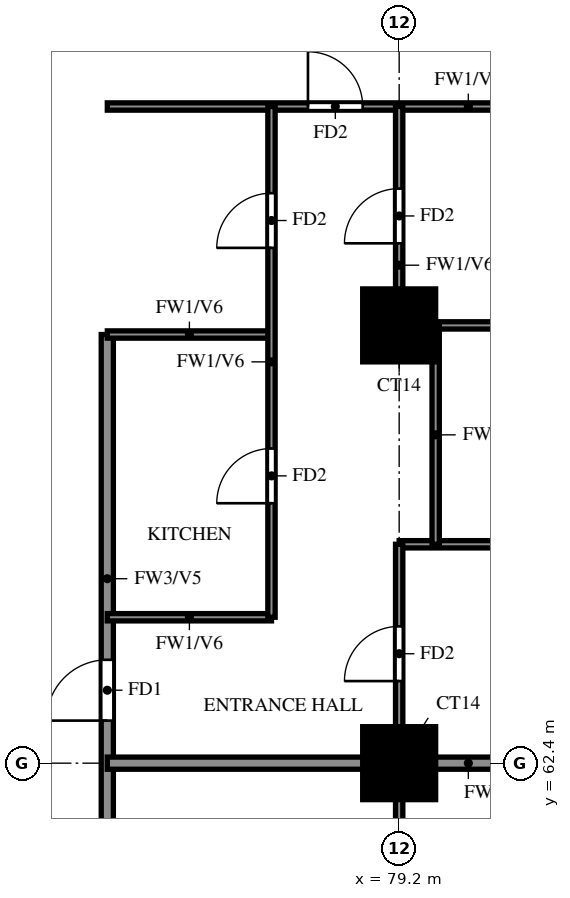
"""IFC4 building model, lengths in metres.
Left out: names, types, materials, properties, quantities, classifications, styles, units other than length and angle.
Written with IfcOpenShell. Run it as: python <this file> out.ifc"""

import sys

from ifc_helpers import new_model, si_unit, direction, frame, frame_2d, origin, origin_2d, place, context, subcontext, project, spatial, rectangle, extrude, source, transform, mapped, element, fill, save


model = new_model("IFC4")
c1 = context("Model", 3, precision=1e-05, world=origin(), true_north=direction((0.0, 1.0)))
c2 = subcontext(c1, "Body", "Model", "MODEL_VIEW")
j1 = project(units=[si_unit("LENGTHUNIT", "METRE"), si_unit("PLANEANGLEUNIT", "RADIAN")], contexts=[c1])
p1 = place(None, origin())
s1 = spatial("IfcSite", under=j1, at=p1, CompositionType="ELEMENT")
p2 = place(p1, origin())
s2 = spatial("IfcBuilding", under=s1, at=p2, CompositionType="ELEMENT")
p3 = place(p2, frame((0.0, 0.0, 104.0)))
s3 = spatial("IfcBuildingStorey", under=s2, at=p3, CompositionType="ELEMENT", Elevation=104.0)
m1 = source(origin(), c2, "Body", "SweptSolid", [
    extrude(rectangle(XDim=1.2, YDim=1.2, at=origin_2d()), origin(), (0.0, 0.0, 1.0), 3.1),
])
for number, where, z_axis, x_axis in (
    (1, (79.2, 62.4, 0.0), (0.0, 0.0, 1.0), (1.0, 0.0, 0.0)),
    (2, (79.2, 69.6, 0.0), (0.0, 0.0, 1.0), (1.0, 0.0, 0.0)),
):
    element("IfcColumn", number, at=place(p3, frame(where, z_axis=z_axis, x_axis=x_axis)), inside=s3, PredefinedType="COLUMN", context=c2, shape_type="MappedRepresentation", body=[
        mapped(m1, transform((0.0, 0.0, 0.0))),
    ])
p4 = place(p3, frame((74.4, 60.0, 0.0), z_axis=(0.0, 0.0, 1.0), x_axis=(0.0, 1.0, 0.0)))
e3 = element("IfcWall", 3, at=p4, inside=s3, PredefinedType="SOLIDWALL", context=c2, shape_type="SweptSolid", body=[
    extrude(rectangle(XDim=9.45, YDim=0.2, at=frame_2d((4.725, 0.0))), origin(), (0.0, 0.0, 1.0), 3.1),
])
p5 = place(p4, frame((3.1, 0.0, 0.0)))
e4 = element("IfcOpeningElement", 4, at=p5, cuts=e3, PredefinedType="OPENING", context=c2, shape_type="SweptSolid", body=[
    extrude(rectangle(XDim=1.0, YDim=2.1, at=frame_2d((0.5, 1.05))), frame((0.0, 0.11, 0.0), z_axis=(0.0, -1.0, 0.0), x_axis=(1.0, 0.0, 0.0)), (0.0, 0.0, 1.0), 0.22),
])
p6 = place(p3, frame((74.4, 62.4, 0.0), z_axis=(0.0, 0.0, 1.0), x_axis=(1.0, 0.0, 0.0)))
e5 = element("IfcWall", 5, at=p6, inside=s3, PredefinedType="SOLIDWALL", context=c2, shape_type="SweptSolid", body=[
    extrude(rectangle(XDim=11.875, YDim=0.2, at=frame_2d((5.938, 0.0))), origin(), (0.0, 0.0, 1.0), 3.1),
])
p7 = place(p3, frame((74.4, 64.8, 0.0), z_axis=(0.0, 0.0, 1.0), x_axis=(1.0, 0.0, 0.0)))
e6 = element("IfcWall", 6, at=p7, inside=s3, PredefinedType="PARTITIONING", context=c2, shape_type="SweptSolid", body=[
    extrude(rectangle(XDim=2.7, YDim=0.12, at=frame_2d((1.35, 0.0))), origin(), (0.0, 0.0, 1.0), 3.1),
])
p8 = place(p3, frame((79.2, 66.0, 0.0), z_axis=(0.0, 0.0, 1.0), x_axis=(1.0, 0.0, 0.0)))
e7 = element("IfcWall", 7, at=p8, inside=s3, PredefinedType="PARTITIONING", context=c2, shape_type="SweptSolid", body=[
    extrude(rectangle(XDim=7.075, YDim=0.12, at=frame_2d((3.538, 0.0))), origin(), (0.0, 0.0, 1.0), 3.1),
])
p9 = place(p8, frame((3.438, 0.0, 0.0)))
e8 = element("IfcOpeningElement", 8, at=p9, cuts=e7, PredefinedType="OPENING", context=c2, shape_type="SweptSolid", body=[
    extrude(rectangle(XDim=0.8, YDim=2.1, at=frame_2d((0.4, 1.05))), frame((0.0, 0.07, 0.0), z_axis=(0.0, -1.0, 0.0), x_axis=(1.0, 0.0, 0.0)), (0.0, 0.0, 1.0), 0.14),
])
p10 = place(p3, frame((74.4, 69.45, 0.0), z_axis=(0.0, 0.0, 1.0), x_axis=(1.0, 0.0, 0.0)))
e9 = element("IfcWall", 9, at=p10, inside=s3, PredefinedType="PARTITIONING", context=c2, shape_type="SweptSolid", body=[
    extrude(rectangle(XDim=2.7, YDim=0.12, at=frame_2d((1.35, 0.0))), origin(), (0.0, 0.0, 1.0), 3.1),
])
p11 = place(p3, frame((79.2, 69.6, 0.0), z_axis=(0.0, 0.0, 1.0), x_axis=(1.0, 0.0, 0.0)))
e10 = element("IfcWall", 10, at=p11, inside=s3, PredefinedType="PARTITIONING", context=c2, shape_type="SweptSolid", body=[
    extrude(rectangle(XDim=7.075, YDim=0.12, at=frame_2d((3.538, 0.0))), origin(), (0.0, 0.0, 1.0), 3.1),
])
p12 = place(p3, frame((74.4, 73.2, 0.0), z_axis=(0.0, 0.0, 1.0), x_axis=(1.0, 0.0, 0.0)))
e11 = element("IfcWall", 11, at=p12, inside=s3, PredefinedType="PARTITIONING", context=c2, shape_type="SweptSolid", body=[
    extrude(rectangle(XDim=11.875, YDim=0.12, at=frame_2d((5.938, 0.0))), origin(), (0.0, 0.0, 1.0), 3.1),
])
p13 = place(p12, frame((3.3, 0.0, 0.0)))
e12 = element("IfcOpeningElement", 12, at=p13, cuts=e11, PredefinedType="OPENING", context=c2, shape_type="SweptSolid", body=[
    extrude(rectangle(XDim=0.9, YDim=2.1, at=frame_2d((0.45, 1.05))), frame((0.0, 0.07, 0.0), z_axis=(0.0, -1.0, 0.0), x_axis=(1.0, 0.0, 0.0)), (0.0, 0.0, 1.0), 0.14),
])
p14 = place(p3, frame((77.1, 64.8, 0.0), z_axis=(0.0, 0.0, 1.0), x_axis=(0.0, 1.0, 0.0)))
e13 = element("IfcWall", 13, at=p14, inside=s3, PredefinedType="PARTITIONING", context=c2, shape_type="SweptSolid", body=[
    extrude(rectangle(XDim=8.4, YDim=0.12, at=frame_2d((4.2, 0.0))), origin(), (0.0, 0.0, 1.0), 3.1),
])
p15 = place(p14, frame((1.875, 0.0, 0.0)))
e14 = element("IfcOpeningElement", 14, at=p15, cuts=e13, PredefinedType="OPENING", context=c2, shape_type="SweptSolid", body=[
    extrude(rectangle(XDim=0.9, YDim=2.1, at=frame_2d((0.45, 1.05))), frame((0.0, 0.07, 0.0), z_axis=(0.0, -1.0, 0.0), x_axis=(1.0, 0.0, 0.0)), (0.0, 0.0, 1.0), 0.14),
])
p16 = place(p14, frame((6.075, 0.0, 0.0)))
e15 = element("IfcOpeningElement", 15, at=p16, cuts=e13, PredefinedType="OPENING", context=c2, shape_type="SweptSolid", body=[
    extrude(rectangle(XDim=0.9, YDim=2.1, at=frame_2d((0.45, 1.05))), frame((0.0, 0.07, 0.0), z_axis=(0.0, -1.0, 0.0), x_axis=(1.0, 0.0, 0.0)), (0.0, 0.0, 1.0), 0.14),
])
p17 = place(p3, frame((79.2, 48.125, 0.0), z_axis=(0.0, 0.0, 1.0), x_axis=(0.0, 1.0, 0.0)))
e16 = element("IfcWall", 16, at=p17, inside=s3, PredefinedType="PARTITIONING", context=c2, shape_type="SweptSolid", body=[
    extrude(rectangle(XDim=17.875, YDim=0.12, at=frame_2d((8.938, 0.0))), origin(), (0.0, 0.0, 1.0), 3.1),
])
p18 = place(p17, frame((1.288, 0.0, 0.0)))
e17 = element("IfcOpeningElement", 17, at=p18, cuts=e16, PredefinedType="OPENING", context=c2, shape_type="SweptSolid", body=[
    extrude(rectangle(XDim=0.9, YDim=2.1, at=frame_2d((0.45, 1.05))), frame((0.0, 0.07, 0.0), z_axis=(0.0, -1.0, 0.0), x_axis=(1.0, 0.0, 0.0)), (0.0, 0.0, 1.0), 0.14),
])
p19 = place(p17, frame((7.825, 0.0, 0.0)))
e18 = element("IfcOpeningElement", 18, at=p19, cuts=e16, PredefinedType="OPENING", context=c2, shape_type="SweptSolid", body=[
    extrude(rectangle(XDim=1.5, YDim=2.1, at=frame_2d((0.75, 1.05))), frame((0.0, 0.07, 0.0), z_axis=(0.0, -1.0, 0.0), x_axis=(1.0, 0.0, 0.0)), (0.0, 0.0, 1.0), 0.14),
])
p20 = place(p17, frame((12.025, 0.0, 0.0)))
e19 = element("IfcOpeningElement", 19, at=p20, cuts=e16, PredefinedType="OPENING", context=c2, shape_type="SweptSolid", body=[
    extrude(rectangle(XDim=0.9, YDim=2.1, at=frame_2d((0.45, 1.05))), frame((0.0, 0.07, 0.0), z_axis=(0.0, -1.0, 0.0), x_axis=(1.0, 0.0, 0.0)), (0.0, 0.0, 1.0), 0.14),
])
p21 = place(p17, frame((15.625, 0.0, 0.0)))
e20 = element("IfcOpeningElement", 20, at=p21, cuts=e16, PredefinedType="OPENING", context=c2, shape_type="SweptSolid", body=[
    extrude(rectangle(XDim=0.9, YDim=2.1, at=frame_2d((0.45, 1.05))), frame((0.0, 0.07, 0.0), z_axis=(0.0, -1.0, 0.0), x_axis=(1.0, 0.0, 0.0)), (0.0, 0.0, 1.0), 0.14),
])
p22 = place(p3, frame((79.2, 69.6, 0.0), z_axis=(0.0, 0.0, 1.0), x_axis=(0.0, 1.0, 0.0)))
e21 = element("IfcWall", 21, at=p22, inside=s3, PredefinedType="PARTITIONING", context=c2, shape_type="SweptSolid", body=[
    extrude(rectangle(XDim=3.6, YDim=0.12, at=frame_2d((1.8, 0.0))), origin(), (0.0, 0.0, 1.0), 3.1),
])
p23 = place(p22, frame((1.35, 0.0, 0.0)))
e22 = element("IfcOpeningElement", 22, at=p23, cuts=e21, PredefinedType="OPENING", context=c2, shape_type="SweptSolid", body=[
    extrude(rectangle(XDim=0.9, YDim=2.1, at=frame_2d((0.45, 1.05))), frame((0.0, 0.07, 0.0), z_axis=(0.0, -1.0, 0.0), x_axis=(1.0, 0.0, 0.0)), (0.0, 0.0, 1.0), 0.14),
])
p24 = place(p3, frame((79.8, 66.0, 0.0), z_axis=(0.0, 0.0, 1.0), x_axis=(0.0, 1.0, 0.0)))
e23 = element("IfcWall", 23, at=p24, inside=s3, PredefinedType="PARTITIONING", context=c2, shape_type="SweptSolid", body=[
    extrude(rectangle(XDim=3.6, YDim=0.12, at=frame_2d((1.8, 0.0))), origin(), (0.0, 0.0, 1.0), 3.1),
])
p25 = place(p5, origin())
e24 = element("IfcDoor", 24, at=p25, inside=s3, OperationType="SINGLE_SWING_LEFT", PredefinedType="DOOR", context=c2, shape_type="SweptSolid", body=[
    extrude(rectangle(XDim=1.0, YDim=2.1, at=frame_2d((0.5, 1.05))), frame((0.0, 0.025, 0.0), z_axis=(0.0, -1.0, 0.0), x_axis=(1.0, 0.0, 0.0)), (0.0, 0.0, 1.0), 0.05),
])
fill(e4, e24)
p26 = place(p21, origin())
e25 = element("IfcDoor", 25, at=p26, inside=s3, OperationType="SINGLE_SWING_LEFT", PredefinedType="DOOR", context=c2, shape_type="SweptSolid", body=[
    extrude(rectangle(XDim=0.9, YDim=2.1, at=frame_2d((0.45, 1.05))), frame((0.0, 0.025, 0.0), z_axis=(0.0, -1.0, 0.0), x_axis=(1.0, 0.0, 0.0)), (0.0, 0.0, 1.0), 0.05),
])
fill(e20, e25)
p27 = place(p23, origin())
e26 = element("IfcDoor", 26, at=p27, inside=s3, OperationType="SINGLE_SWING_LEFT", PredefinedType="DOOR", context=c2, shape_type="SweptSolid", body=[
    extrude(rectangle(XDim=0.9, YDim=2.1, at=frame_2d((0.45, 1.05))), frame((0.0, 0.025, 0.0), z_axis=(0.0, -1.0, 0.0), x_axis=(1.0, 0.0, 0.0)), (0.0, 0.0, 1.0), 0.05),
])
fill(e22, e26)
p28 = place(p13, origin())
e27 = element("IfcDoor", 27, at=p28, inside=s3, OperationType="SINGLE_SWING_LEFT", PredefinedType="DOOR", context=c2, shape_type="SweptSolid", body=[
    extrude(rectangle(XDim=0.9, YDim=2.1, at=frame_2d((0.45, 1.05))), frame((0.0, 0.025, 0.0), z_axis=(0.0, -1.0, 0.0), x_axis=(1.0, 0.0, 0.0)), (0.0, 0.0, 1.0), 0.05),
])
fill(e12, e27)
p29 = place(p15, origin())
e28 = element("IfcDoor", 28, at=p29, inside=s3, OperationType="SINGLE_SWING_RIGHT", PredefinedType="DOOR", context=c2, shape_type="SweptSolid", body=[
    extrude(rectangle(XDim=0.9, YDim=2.1, at=frame_2d((0.45, 1.05))), frame((0.0, 0.025, 0.0), z_axis=(0.0, -1.0, 0.0), x_axis=(1.0, 0.0, 0.0)), (0.0, 0.0, 1.0), 0.05),
])
fill(e14, e28)
p30 = place(p16, origin())
e29 = element("IfcDoor", 29, at=p30, inside=s3, OperationType="SINGLE_SWING_LEFT", PredefinedType="DOOR", context=c2, shape_type="SweptSolid", body=[
    extrude(rectangle(XDim=0.9, YDim=2.1, at=frame_2d((0.45, 1.05))), frame((0.0, 0.025, 0.0), z_axis=(0.0, -1.0, 0.0), x_axis=(1.0, 0.0, 0.0)), (0.0, 0.0, 1.0), 0.05),
])
fill(e15, e29)
save(model, sys.argv[1])
